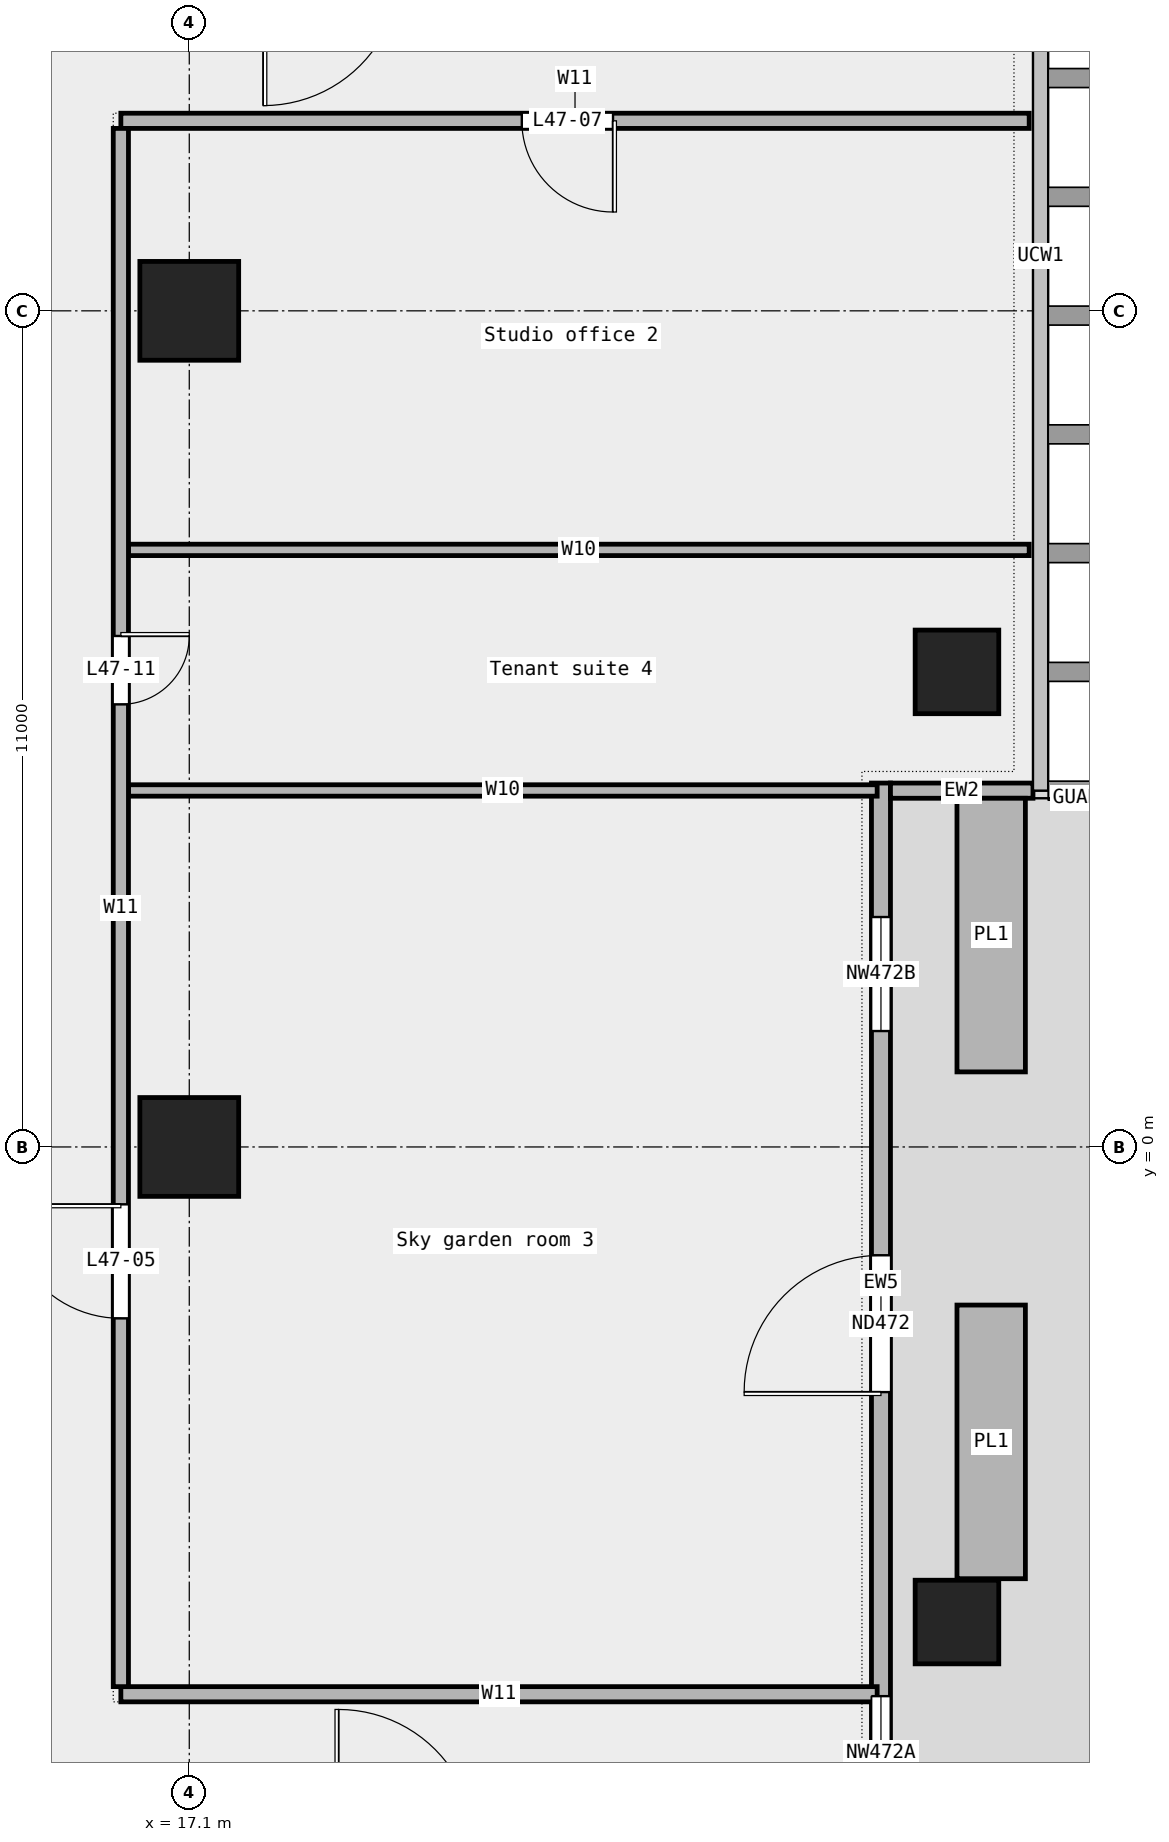
"""IFC4 building model, lengths in metres.
Left out: names, types, materials, properties, quantities, classifications, styles, units other than length and angle.
Written with IfcOpenShell. Run it as: python <this file> out.ifc"""

import sys

from ifc_helpers import new_model, si_unit, direction, frame, frame_2d, origin, origin_2d, place, context, subcontext, project, spatial, rectangle, extrude, element, fill, save


model = new_model("IFC4")
c1 = context("Model", 3, precision=1e-05, world=origin(), true_north=direction((0.0, 1.0)))
c2 = subcontext(c1, "Body", "Model", "MODEL_VIEW")
j1 = project(units=[si_unit("LENGTHUNIT", "METRE"), si_unit("PLANEANGLEUNIT", "RADIAN")], contexts=[c1])
p1 = place(None, origin())
s1 = spatial("IfcSite", under=j1, at=p1, CompositionType="ELEMENT")
p2 = place(p1, origin())
s2 = spatial("IfcBuilding", under=s1, at=p2, CompositionType="ELEMENT")
p3 = place(p2, frame((0.0, 0.0, 223.0)))
s3 = spatial("IfcBuildingStorey", under=s2, at=p3, CompositionType="ELEMENT", Elevation=223.0)
for number, where, z_axis, x_axis in (
    (1, (27.2, -6.25, 0.0), (0.0, 0.0, 1.0), (1.0, 0.0, 0.0)),
    (2, (27.2, 6.25, 0.0), (0.0, 0.0, 1.0), (1.0, 0.0, 0.0)),
):
    element("IfcColumn", number, at=place(p3, frame(where, z_axis=z_axis, x_axis=x_axis)), inside=s3, PredefinedType="COLUMN", context=c2, shape_type="SweptSolid", body=[
        extrude(rectangle(XDim=1.1, YDim=1.1, at=origin_2d()), origin(), (0.0, 0.0, 1.0), 3.6),
    ])
for number, where, z_axis, x_axis in (
    (3, (17.1, 0.0, 0.0), (0.0, 0.0, 1.0), (1.0, 0.0, 0.0)),
    (4, (17.1, 11.0, 0.0), (0.0, 0.0, 1.0), (1.0, 0.0, 0.0)),
):
    element("IfcColumn", number, at=place(p3, frame(where, z_axis=z_axis, x_axis=x_axis)), inside=s3, PredefinedType="COLUMN", context=c2, shape_type="SweptSolid", body=[
        extrude(rectangle(XDim=1.3, YDim=1.3, at=origin_2d()), origin(), (0.0, 0.0, 1.0), 3.6),
    ])
p4 = place(p3, frame((26.2, -9.475, 0.0), z_axis=(0.0, 0.0, 1.0), x_axis=(0.0, 1.0, 0.0)))
e5 = element("IfcWall", 5, at=p4, inside=s3, PredefinedType="STANDARD", context=c2, shape_type="SweptSolid", body=[
    extrude(rectangle(XDim=14.263, YDim=0.25, at=frame_2d((7.131, 0.0))), origin(), (0.0, 0.0, 1.0), 3.6),
])
p5 = place(p4, frame((0.75, 0.0, 0.45)))
e6 = element("IfcOpeningElement", 6, at=p5, cuts=e5, PredefinedType="OPENING", context=c2, shape_type="SweptSolid", body=[
    extrude(rectangle(XDim=1.5, YDim=2.4, at=frame_2d((0.75, 1.2))), frame((0.0, 0.137, 0.0), z_axis=(0.0, -1.0, 0.0), x_axis=(1.0, 0.0, 0.0)), (0.0, 0.0, 1.0), 0.274),
])
p6 = place(p4, frame((6.25, 0.0, 0.0)))
e7 = element("IfcOpeningElement", 7, at=p6, cuts=e5, PredefinedType="OPENING", context=c2, shape_type="SweptSolid", body=[
    extrude(rectangle(XDim=1.8, YDim=2.4, at=frame_2d((0.9, 1.2))), frame((0.0, 0.137, 0.0), z_axis=(0.0, -1.0, 0.0), x_axis=(1.0, 0.0, 0.0)), (0.0, 0.0, 1.0), 0.274),
])
p7 = place(p4, frame((11.0, 0.0, 0.45)))
e8 = element("IfcOpeningElement", 8, at=p7, cuts=e5, PredefinedType="OPENING", context=c2, shape_type="SweptSolid", body=[
    extrude(rectangle(XDim=1.5, YDim=2.4, at=frame_2d((0.75, 1.2))), frame((0.0, 0.137, 0.0), z_axis=(0.0, -1.0, 0.0), x_axis=(1.0, 0.0, 0.0)), (0.0, 0.0, 1.0), 0.274),
])
p8 = place(p3, frame((28.2, 4.688, 0.0), z_axis=(0.0, 0.0, 1.0), x_axis=(-1.0, 0.0, 0.0)))
e9 = element("IfcWall", 9, at=p8, inside=s3, PredefinedType="STANDARD", context=c2, shape_type="SweptSolid", body=[
    extrude(rectangle(XDim=1.875, YDim=0.2, at=frame_2d((0.938, 0.0))), origin(), (0.0, 0.0, 1.0), 3.6),
])
for number, where, z_axis, x_axis in (
    (10, (27.65, -5.68, 0.0), (0.0, 0.0, 1.0), (0.0, 1.0, 0.0)),
    (11, (27.65, 0.988, 0.0), (0.0, 0.0, 1.0), (0.0, 1.0, 0.0)),
):
    element("IfcWall", number, at=place(p3, frame(where, z_axis=z_axis, x_axis=x_axis)), inside=s3, PredefinedType="STANDARD", context=c2, shape_type="SweptSolid", body=[
        extrude(rectangle(XDim=3.6, YDim=0.9, at=frame_2d((1.8, 0.0))), origin(), (0.0, 0.0, 1.0), 0.7),
    ])
p9 = place(p3, frame((16.2, -7.2, 0.0), z_axis=(0.0, 0.0, 1.0), x_axis=(1.0, 0.0, 0.0)))
e12 = element("IfcWall", 12, at=p9, inside=s3, PredefinedType="PARTITIONING", context=c2, shape_type="SweptSolid", body=[
    extrude(rectangle(XDim=9.95, YDim=0.2, at=frame_2d((4.975, 0.0))), origin(), (0.0, 0.0, 1.0), 3.6),
])
p10 = place(p3, frame((16.3, 4.69, 0.0), z_axis=(0.0, 0.0, 1.0), x_axis=(1.0, 0.0, 0.0)))
e13 = element("IfcWall", 13, at=p10, inside=s3, PredefinedType="PARTITIONING", context=c2, shape_type="SweptSolid", body=[
    extrude(rectangle(XDim=9.85, YDim=0.15, at=frame_2d((4.925, 0.0))), origin(), (0.0, 0.0, 1.0), 3.6),
])
p11 = place(p3, frame((16.3, 7.855, 0.0), z_axis=(0.0, 0.0, 1.0), x_axis=(1.0, 0.0, 0.0)))
e14 = element("IfcWall", 14, at=p11, inside=s3, PredefinedType="PARTITIONING", context=c2, shape_type="SweptSolid", body=[
    extrude(rectangle(XDim=11.85, YDim=0.15, at=frame_2d((5.925, 0.0))), origin(), (0.0, 0.0, 1.0), 3.6),
])
p12 = place(p3, frame((16.2, 13.5, 0.0), z_axis=(0.0, 0.0, 1.0), x_axis=(1.0, 0.0, 0.0)))
e15 = element("IfcWall", 15, at=p12, inside=s3, PredefinedType="PARTITIONING", context=c2, shape_type="SweptSolid", body=[
    extrude(rectangle(XDim=11.95, YDim=0.2, at=frame_2d((5.975, 0.0))), origin(), (0.0, 0.0, 1.0), 3.6),
])
p13 = place(p12, frame((5.275, 0.0, 0.0)))
e16 = element("IfcOpeningElement", 16, at=p13, cuts=e15, PredefinedType="OPENING", context=c2, shape_type="SweptSolid", body=[
    extrude(rectangle(XDim=1.2, YDim=2.1, at=frame_2d((0.6, 1.05))), frame((0.0, 0.112, 0.0), z_axis=(0.0, -1.0, 0.0), x_axis=(1.0, 0.0, 0.0)), (0.0, 0.0, 1.0), 0.224),
])
p14 = place(p3, frame((16.2, -7.1, 0.0), z_axis=(0.0, 0.0, 1.0), x_axis=(0.0, 1.0, 0.0)))
e17 = element("IfcWall", 17, at=p14, inside=s3, PredefinedType="PARTITIONING", context=c2, shape_type="SweptSolid", body=[
    extrude(rectangle(XDim=20.5, YDim=0.2, at=frame_2d((10.25, 0.0))), origin(), (0.0, 0.0, 1.0), 3.6),
])
p15 = place(p14, frame((4.845, 0.0, 0.0)))
e18 = element("IfcOpeningElement", 18, at=p15, cuts=e17, PredefinedType="OPENING", context=c2, shape_type="SweptSolid", body=[
    extrude(rectangle(XDim=1.5, YDim=2.1, at=frame_2d((0.75, 1.05))), frame((0.0, 0.112, 0.0), z_axis=(0.0, -1.0, 0.0), x_axis=(1.0, 0.0, 0.0)), (0.0, 0.0, 1.0), 0.224),
])
p16 = place(p14, frame((12.923, 0.0, 0.0)))
e19 = element("IfcOpeningElement", 19, at=p16, cuts=e17, PredefinedType="OPENING", context=c2, shape_type="SweptSolid", body=[
    extrude(rectangle(XDim=0.9, YDim=2.1, at=frame_2d((0.45, 1.05))), frame((0.0, 0.112, 0.0), z_axis=(0.0, -1.0, 0.0), x_axis=(1.0, 0.0, 0.0)), (0.0, 0.0, 1.0), 0.224),
])
p17 = place(p5, origin())
e20 = element("IfcWindow", 20, at=p17, inside=s3, PartitioningType="SINGLE_PANEL", PredefinedType="WINDOW", context=c2, shape_type="SweptSolid", body=[
    extrude(rectangle(XDim=1.5, YDim=2.4, at=frame_2d((0.75, 1.2))), frame((0.0, 0.03, 0.0), z_axis=(0.0, -1.0, 0.0), x_axis=(1.0, 0.0, 0.0)), (0.0, 0.0, 1.0), 0.06),
])
fill(e6, e20)
p18 = place(p6, origin())
e21 = element("IfcDoor", 21, at=p18, inside=s3, OperationType="DOUBLE_DOOR_SINGLE_SWING", PredefinedType="DOOR", context=c2, shape_type="SweptSolid", body=[
    extrude(rectangle(XDim=1.8, YDim=2.4, at=frame_2d((0.9, 1.2))), frame((0.0, 0.025, 0.0), z_axis=(0.0, -1.0, 0.0), x_axis=(1.0, 0.0, 0.0)), (0.0, 0.0, 1.0), 0.05),
])
fill(e7, e21)
p19 = place(p7, origin())
e22 = element("IfcWindow", 22, at=p19, inside=s3, PartitioningType="SINGLE_PANEL", PredefinedType="WINDOW", context=c2, shape_type="SweptSolid", body=[
    extrude(rectangle(XDim=1.5, YDim=2.4, at=frame_2d((0.75, 1.2))), frame((0.0, 0.03, 0.0), z_axis=(0.0, -1.0, 0.0), x_axis=(1.0, 0.0, 0.0)), (0.0, 0.0, 1.0), 0.06),
])
fill(e8, e22)
p20 = place(p15, origin())
e23 = element("IfcDoor", 23, at=p20, inside=s3, OperationType="DOUBLE_DOOR_SINGLE_SWING", PredefinedType="DOOR", context=c2, shape_type="SweptSolid", body=[
    extrude(rectangle(XDim=1.5, YDim=2.1, at=frame_2d((0.75, 1.05))), frame((0.0, 0.025, 0.0), z_axis=(0.0, -1.0, 0.0), x_axis=(1.0, 0.0, 0.0)), (0.0, 0.0, 1.0), 0.05),
])
fill(e18, e23)
p21 = place(p13, origin())
e24 = element("IfcDoor", 24, at=p21, inside=s3, OperationType="SINGLE_SWING_LEFT", PredefinedType="DOOR", context=c2, shape_type="SweptSolid", body=[
    extrude(rectangle(XDim=1.2, YDim=2.1, at=frame_2d((0.6, 1.05))), frame((0.0, 0.025, 0.0), z_axis=(0.0, -1.0, 0.0), x_axis=(1.0, 0.0, 0.0)), (0.0, 0.0, 1.0), 0.05),
])
fill(e16, e24)
p22 = place(p16, origin())
e25 = element("IfcDoor", 25, at=p22, inside=s3, OperationType="SINGLE_SWING_LEFT", PredefinedType="DOOR", context=c2, shape_type="SweptSolid", body=[
    extrude(rectangle(XDim=0.9, YDim=2.1, at=frame_2d((0.45, 1.05))), frame((0.0, 0.025, 0.0), z_axis=(0.0, -1.0, 0.0), x_axis=(1.0, 0.0, 0.0)), (0.0, 0.0, 1.0), 0.05),
])
fill(e19, e25)
save(model, sys.argv[1])
